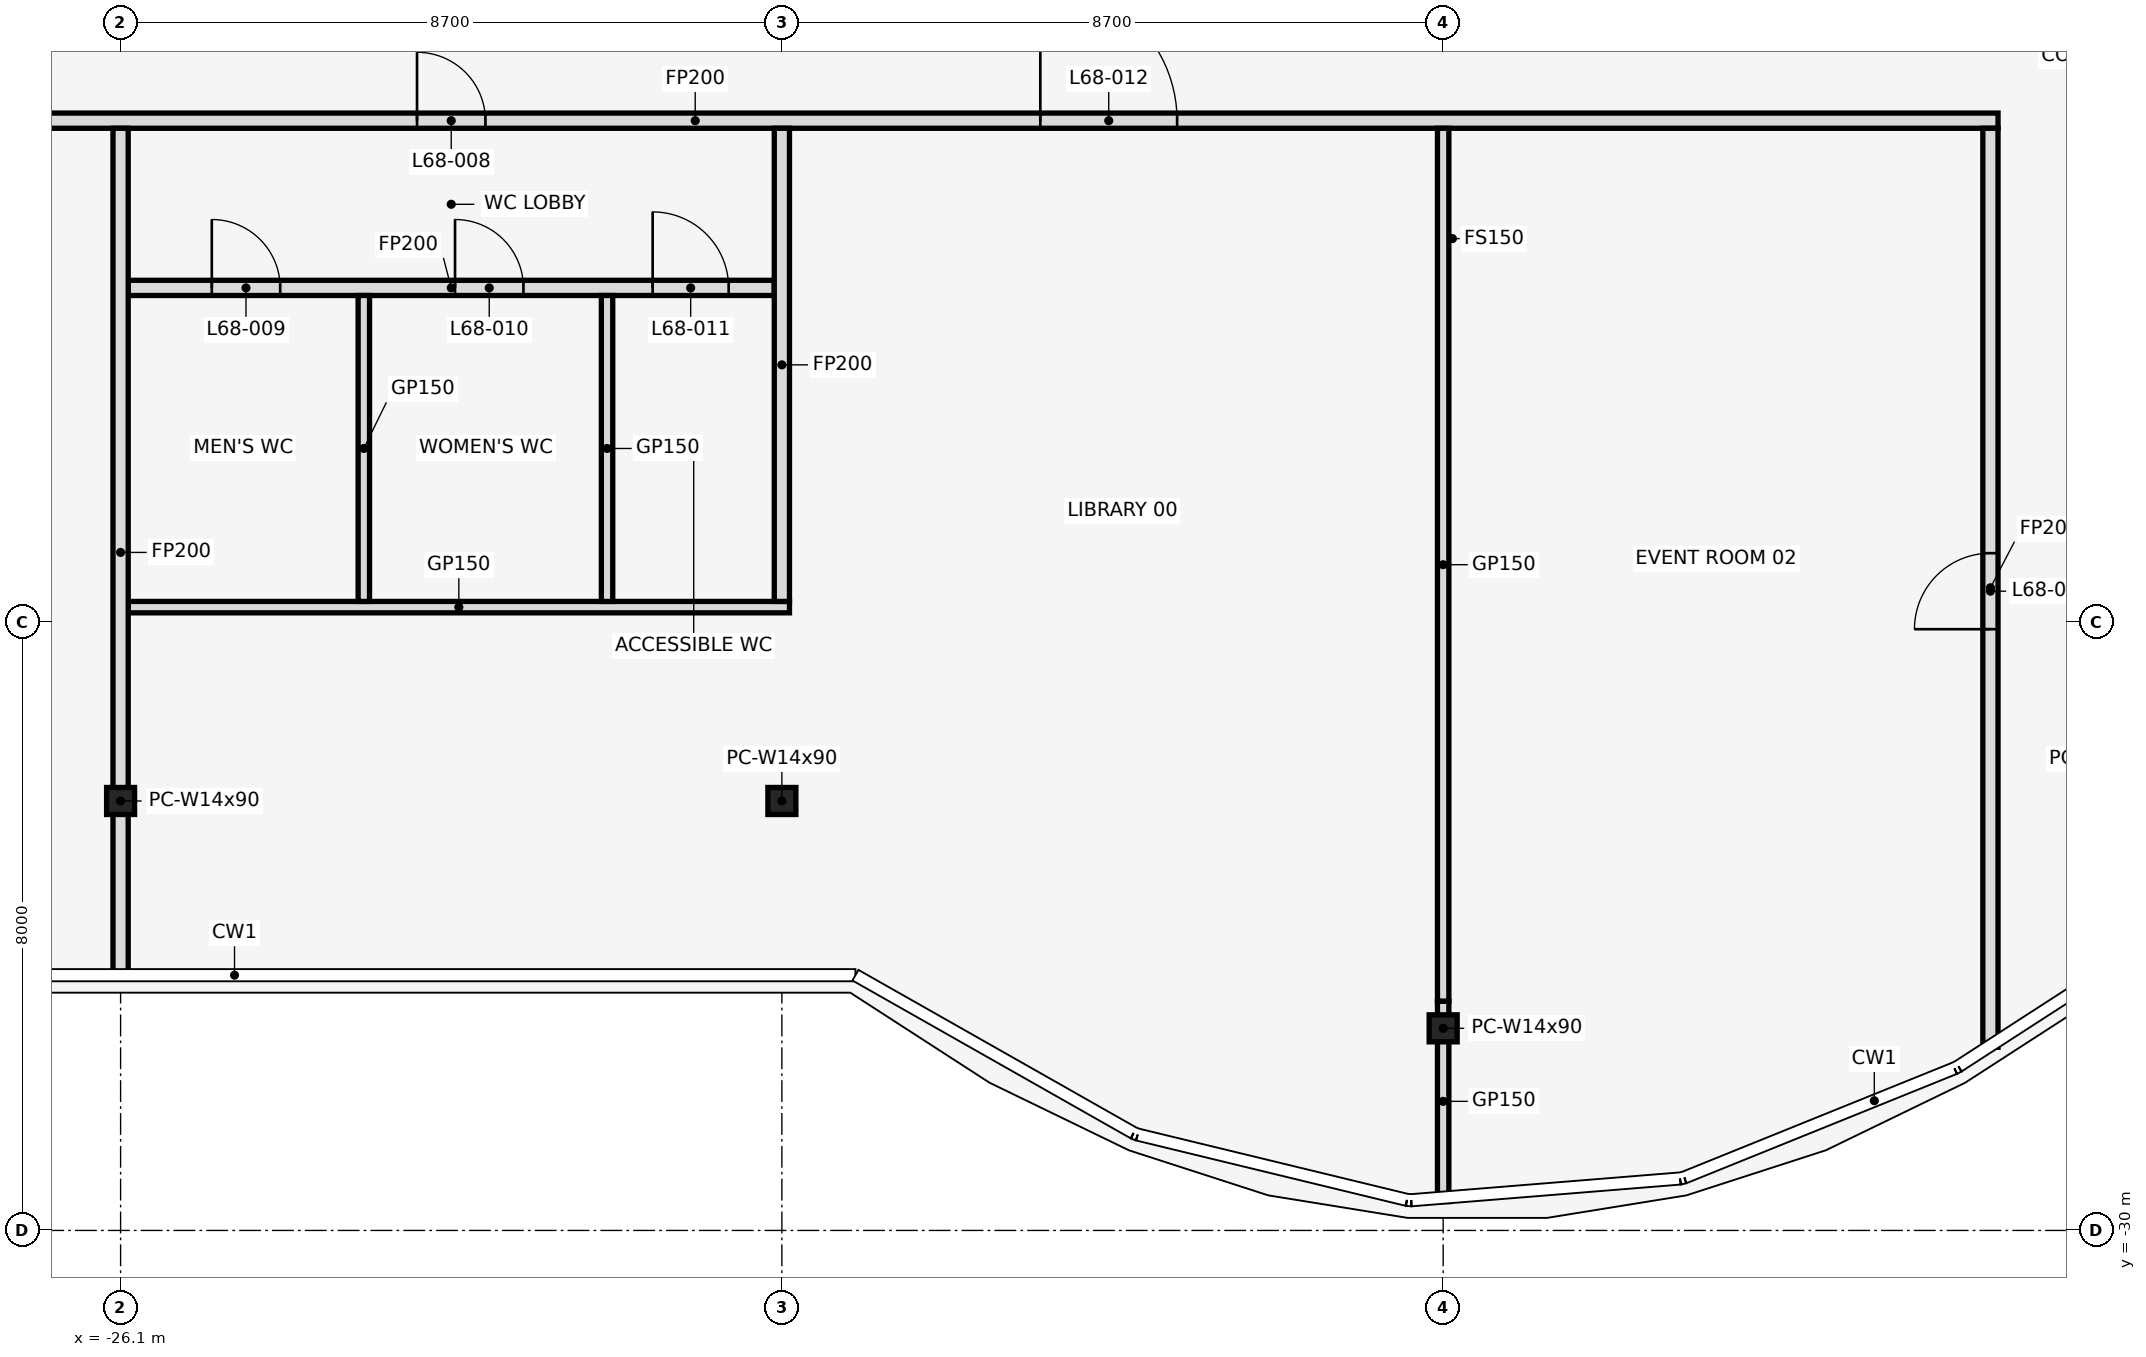
"""IFC4 building model, lengths in metres.
Left out: names, types, materials, properties, quantities, classifications, styles, units other than length and angle.
Written with IfcOpenShell. Run it as: python <this file> out.ifc"""

import sys

from ifc_helpers import new_model, si_unit, direction, frame, frame_2d, origin, origin_2d, place, context, subcontext, project, spatial, rectangle, i_section, extrude, element, fill, save


model = new_model("IFC4")
c1 = context("Model", 3, precision=1e-05, world=origin(), true_north=direction((0.0, 1.0)))
c2 = subcontext(c1, "Body", "Model", "MODEL_VIEW")
j1 = project(units=[si_unit("LENGTHUNIT", "METRE"), si_unit("PLANEANGLEUNIT", "RADIAN")], contexts=[c1])
p1 = place(None, origin())
s1 = spatial("IfcSite", under=j1, at=p1, CompositionType="ELEMENT")
p2 = place(p1, origin())
s2 = spatial("IfcBuilding", under=s1, at=p2, CompositionType="ELEMENT")
p3 = place(p2, frame((0.0, 0.0, 302.0)))
s3 = spatial("IfcBuildingStorey", under=s2, at=p3, CompositionType="ELEMENT", Elevation=302.0)
for number, where, z_axis, x_axis in (
    (1, (-26.1, -24.35, 0.0), (0.0, 0.0, 1.0), (1.0, 0.0, 0.0)),
    (2, (-17.4, -24.35, 0.0), (0.0, 0.0, 1.0), (1.0, 0.0, 0.0)),
    (3, (-8.7, -27.341, 0.0), (0.0, 0.0, 1.0), (1.0, 0.0, 0.0)),
):
    element("IfcColumn", number, at=place(p3, frame(where, z_axis=z_axis, x_axis=x_axis)), inside=s3, PredefinedType="COLUMN", context=c2, shape_type="SweptSolid", body=[
        extrude(i_section(OverallWidth=0.368, OverallDepth=0.356, WebThickness=0.011, FlangeThickness=0.018, at=origin_2d()), origin(), (0.0, 0.0, 1.0), 4.5),
    ])
p4 = place(p3, frame((-26.0, -21.8, 0.0), z_axis=(0.0, 0.0, 1.0), x_axis=(1.0, 0.0, 0.0)))
e4 = element("IfcWall", 4, at=p4, inside=s3, PredefinedType="PARTITIONING", context=c2, shape_type="SweptSolid", body=[
    extrude(rectangle(XDim=8.7, YDim=0.15, at=frame_2d((4.35, 0.0))), origin(), (0.0, 0.0, 1.0), 3.418),
])
p5 = place(p3, frame((-26.0, -17.6, 0.0), z_axis=(0.0, 0.0, 1.0), x_axis=(1.0, 0.0, 0.0)))
e5 = element("IfcWall", 5, at=p5, inside=s3, PredefinedType="PARTITIONING", context=c2, shape_type="SweptSolid", body=[
    extrude(rectangle(XDim=8.5, YDim=0.2, at=frame_2d((4.25, 0.0))), origin(), (0.0, 0.0, 1.0), 3.418),
])
p6 = place(p5, frame((1.1, 0.0, 0.0)))
e6 = element("IfcOpeningElement", 6, at=p6, cuts=e5, PredefinedType="OPENING", context=c2, shape_type="SweptSolid", body=[
    extrude(rectangle(XDim=0.9, YDim=2.1, at=frame_2d((0.45, 1.05))), frame((0.0, 0.112, 0.0), z_axis=(0.0, -1.0, 0.0), x_axis=(1.0, 0.0, 0.0)), (0.0, 0.0, 1.0), 0.224),
])
p7 = place(p5, frame((4.3, 0.0, 0.0)))
e7 = element("IfcOpeningElement", 7, at=p7, cuts=e5, PredefinedType="OPENING", context=c2, shape_type="SweptSolid", body=[
    extrude(rectangle(XDim=0.9, YDim=2.1, at=frame_2d((0.45, 1.05))), frame((0.0, 0.112, 0.0), z_axis=(0.0, -1.0, 0.0), x_axis=(1.0, 0.0, 0.0)), (0.0, 0.0, 1.0), 0.224),
])
p8 = place(p5, frame((6.9, 0.0, 0.0)))
e8 = element("IfcOpeningElement", 8, at=p8, cuts=e5, PredefinedType="OPENING", context=c2, shape_type="SweptSolid", body=[
    extrude(rectangle(XDim=1.0, YDim=2.1, at=frame_2d((0.5, 1.05))), frame((0.0, 0.112, 0.0), z_axis=(0.0, -1.0, 0.0), x_axis=(1.0, 0.0, 0.0)), (0.0, 0.0, 1.0), 0.224),
])
p9 = place(p3, frame((-35.68, -15.4, 0.0), z_axis=(0.0, 0.0, 1.0), x_axis=(1.0, 0.0, 0.0)))
e9 = element("IfcWall", 9, at=p9, inside=s3, PredefinedType="PARTITIONING", context=c2, shape_type="SweptSolid", body=[
    extrude(rectangle(XDim=34.28, YDim=0.2, at=frame_2d((17.14, 0.0))), origin(), (0.0, 0.0, 1.0), 3.418),
])
p10 = place(p9, frame((4.3, 0.0, 0.0)))
e10 = element("IfcOpeningElement", 10, at=p10, cuts=e9, PredefinedType="OPENING", context=c2, shape_type="SweptSolid", body=[
    extrude(rectangle(XDim=1.0, YDim=2.1, at=frame_2d((0.5, 1.05))), frame((0.0, 0.112, 0.0), z_axis=(0.0, -1.0, 0.0), x_axis=(1.0, 0.0, 0.0)), (0.0, 0.0, 1.0), 0.224),
])
p11 = place(p9, frame((13.48, 0.0, 0.0)))
e11 = element("IfcOpeningElement", 11, at=p11, cuts=e9, PredefinedType="OPENING", context=c2, shape_type="SweptSolid", body=[
    extrude(rectangle(XDim=0.9, YDim=2.1, at=frame_2d((0.45, 1.05))), frame((0.0, 0.112, 0.0), z_axis=(0.0, -1.0, 0.0), x_axis=(1.0, 0.0, 0.0)), (0.0, 0.0, 1.0), 0.224),
])
p12 = place(p9, frame((21.68, 0.0, 0.0)))
e12 = element("IfcOpeningElement", 12, at=p12, cuts=e9, PredefinedType="OPENING", context=c2, shape_type="SweptSolid", body=[
    extrude(rectangle(XDim=1.8, YDim=2.1, at=frame_2d((0.9, 1.05))), frame((0.0, 0.112, 0.0), z_axis=(0.0, -1.0, 0.0), x_axis=(1.0, 0.0, 0.0)), (0.0, 0.0, 1.0), 0.224),
])
p13 = place(p3, frame((-26.1, -26.66, 0.0), z_axis=(0.0, 0.0, 1.0), x_axis=(0.0, 1.0, 0.0)))
e13 = element("IfcWall", 13, at=p13, inside=s3, PredefinedType="PARTITIONING", context=c2, shape_type="SweptSolid", body=[
    extrude(rectangle(XDim=11.16, YDim=0.2, at=frame_2d((5.58, 0.0))), origin(), (0.0, 0.0, 1.0), 3.418),
])
for number, where, z_axis, x_axis in (
    (14, (-22.9, -21.725, 0.0), (0.0, 0.0, 1.0), (0.0, 1.0, 0.0)),
    (15, (-19.7, -21.725, 0.0), (0.0, 0.0, 1.0), (0.0, 1.0, 0.0)),
):
    element("IfcWall", number, at=place(p3, frame(where, z_axis=z_axis, x_axis=x_axis)), inside=s3, PredefinedType="PARTITIONING", context=c2, shape_type="SweptSolid", body=[
        extrude(rectangle(XDim=4.025, YDim=0.15, at=frame_2d((2.013, 0.0))), origin(), (0.0, 0.0, 1.0), 3.418),
    ])
p14 = place(p3, frame((-17.4, -21.725, 0.0), z_axis=(0.0, 0.0, 1.0), x_axis=(0.0, 1.0, 0.0)))
e16 = element("IfcWall", 16, at=p14, inside=s3, PredefinedType="PARTITIONING", context=c2, shape_type="SweptSolid", body=[
    extrude(rectangle(XDim=6.225, YDim=0.2, at=frame_2d((3.113, 0.0))), origin(), (0.0, 0.0, 1.0), 3.418),
])
p15 = place(p3, frame((-8.7, -29.62, 0.0), z_axis=(0.0, 0.0, 1.0), x_axis=(0.0, 1.0, 0.0)))
e17 = element("IfcWall", 17, at=p15, inside=s3, PredefinedType="PARTITIONING", context=c2, shape_type="SweptSolid", body=[
    extrude(rectangle(XDim=2.637, YDim=0.15, at=frame_2d((1.318, 0.0))), origin(), (0.0, 0.0, 1.0), 3.418),
])
p16 = place(p3, frame((-8.7, -26.983, 0.0), z_axis=(0.0, 0.0, 1.0), x_axis=(0.0, 1.0, 0.0)))
e18 = element("IfcWall", 18, at=p16, inside=s3, PredefinedType="PARTITIONING", context=c2, shape_type="SweptSolid", body=[
    extrude(rectangle(XDim=11.483, YDim=0.15, at=frame_2d((5.742, 0.0))), origin(), (0.0, 0.0, 1.0), 3.418),
])
p17 = place(p3, frame((-1.5, -27.59, 0.0), z_axis=(0.0, 0.0, 1.0), x_axis=(0.0, 1.0, 0.0)))
e19 = element("IfcWall", 19, at=p17, inside=s3, PredefinedType="PARTITIONING", context=c2, shape_type="SweptSolid", body=[
    extrude(rectangle(XDim=12.09, YDim=0.2, at=frame_2d((6.045, 0.0))), origin(), (0.0, 0.0, 1.0), 3.418),
])
p18 = place(p17, frame((5.5, 0.0, 0.0)))
e20 = element("IfcOpeningElement", 20, at=p18, cuts=e19, PredefinedType="OPENING", context=c2, shape_type="SweptSolid", body=[
    extrude(rectangle(XDim=1.0, YDim=2.1, at=frame_2d((0.5, 1.05))), frame((0.0, 0.112, 0.0), z_axis=(0.0, -1.0, 0.0), x_axis=(1.0, 0.0, 0.0)), (0.0, 0.0, 1.0), 0.224),
])
p19 = place(p11, frame((0.9, 0.0, 0.0), z_axis=(0.0, 0.0, 1.0), x_axis=(-1.0, 0.0, 0.0)))
e21 = element("IfcDoor", 21, at=p19, inside=s3, OperationType="SINGLE_SWING_RIGHT", PredefinedType="DOOR", context=c2, shape_type="SweptSolid", body=[
    extrude(rectangle(XDim=0.9, YDim=2.1, at=frame_2d((0.45, 1.05))), frame((0.0, 0.025, 0.0), z_axis=(0.0, -1.0, 0.0), x_axis=(1.0, 0.0, 0.0)), (0.0, 0.0, 1.0), 0.05),
])
fill(e11, e21)
p20 = place(p6, frame((0.9, 0.0, 0.0), z_axis=(0.0, 0.0, 1.0), x_axis=(-1.0, 0.0, 0.0)))
e22 = element("IfcDoor", 22, at=p20, inside=s3, OperationType="SINGLE_SWING_RIGHT", PredefinedType="DOOR", context=c2, shape_type="SweptSolid", body=[
    extrude(rectangle(XDim=0.9, YDim=2.1, at=frame_2d((0.45, 1.05))), frame((0.0, 0.025, 0.0), z_axis=(0.0, -1.0, 0.0), x_axis=(1.0, 0.0, 0.0)), (0.0, 0.0, 1.0), 0.05),
])
fill(e6, e22)
p21 = place(p7, frame((0.9, 0.0, 0.0), z_axis=(0.0, 0.0, 1.0), x_axis=(-1.0, 0.0, 0.0)))
e23 = element("IfcDoor", 23, at=p21, inside=s3, OperationType="SINGLE_SWING_LEFT", PredefinedType="DOOR", context=c2, shape_type="SweptSolid", body=[
    extrude(rectangle(XDim=0.9, YDim=2.1, at=frame_2d((0.45, 1.05))), frame((0.0, 0.025, 0.0), z_axis=(0.0, -1.0, 0.0), x_axis=(1.0, 0.0, 0.0)), (0.0, 0.0, 1.0), 0.05),
])
fill(e7, e23)
p22 = place(p8, frame((1.0, 0.0, 0.0), z_axis=(0.0, 0.0, 1.0), x_axis=(-1.0, 0.0, 0.0)))
e24 = element("IfcDoor", 24, at=p22, inside=s3, OperationType="SINGLE_SWING_RIGHT", PredefinedType="DOOR", context=c2, shape_type="SweptSolid", body=[
    extrude(rectangle(XDim=1.0, YDim=2.1, at=frame_2d((0.5, 1.05))), frame((0.0, 0.025, 0.0), z_axis=(0.0, -1.0, 0.0), x_axis=(1.0, 0.0, 0.0)), (0.0, 0.0, 1.0), 0.05),
])
fill(e8, e24)
p23 = place(p12, origin())
e25 = element("IfcDoor", 25, at=p23, inside=s3, OperationType="SINGLE_SWING_LEFT", PredefinedType="DOOR", context=c2, shape_type="SweptSolid", body=[
    extrude(rectangle(XDim=1.8, YDim=2.1, at=frame_2d((0.9, 1.05))), frame((0.0, 0.025, 0.0), z_axis=(0.0, -1.0, 0.0), x_axis=(1.0, 0.0, 0.0)), (0.0, 0.0, 1.0), 0.05),
])
fill(e12, e25)
p24 = place(p18, origin())
e26 = element("IfcDoor", 26, at=p24, inside=s3, OperationType="SINGLE_SWING_LEFT", PredefinedType="DOOR", context=c2, shape_type="SweptSolid", body=[
    extrude(rectangle(XDim=1.0, YDim=2.1, at=frame_2d((0.5, 1.05))), frame((0.0, 0.025, 0.0), z_axis=(0.0, -1.0, 0.0), x_axis=(1.0, 0.0, 0.0)), (0.0, 0.0, 1.0), 0.05),
])
fill(e20, e26)
save(model, sys.argv[1])
